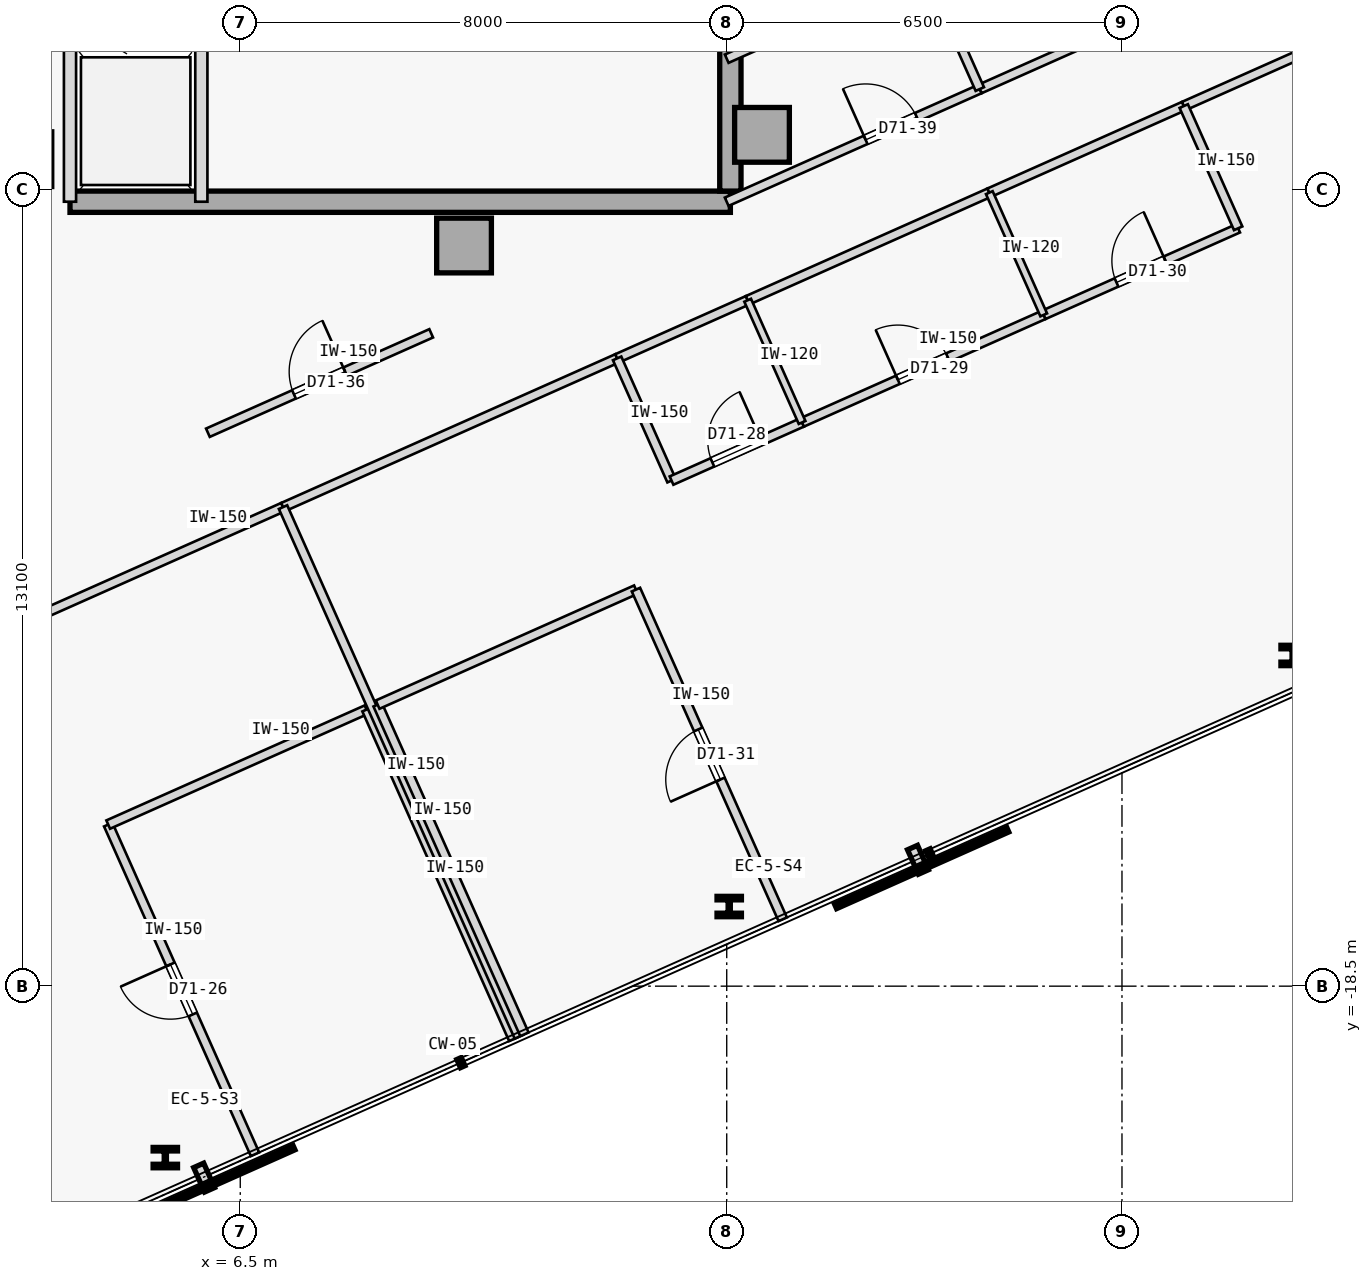
"""IFC4 building model, lengths in metres.
Left out: names, types, materials, properties, quantities, classifications, styles, units other than length and angle.
Written with IfcOpenShell. Run it as: python <this file> out.ifc"""

import sys

from ifc_helpers import new_model, si_unit, direction, frame, frame_2d, origin, origin_2d, place, context, subcontext, project, spatial, rectangle, i_section, extrude, element, fill, save


model = new_model("IFC4")
c1 = context("Model", 3, precision=1e-05, world=origin(), true_north=direction((0.0, 1.0)))
c2 = subcontext(c1, "Body", "Model", "MODEL_VIEW")
j1 = project(units=[si_unit("LENGTHUNIT", "METRE"), si_unit("PLANEANGLEUNIT", "RADIAN")], contexts=[c1])
p1 = place(None, origin())
s1 = spatial("IfcSite", under=j1, at=p1, CompositionType="ELEMENT")
p2 = place(p1, origin())
s2 = spatial("IfcBuilding", under=s1, at=p2, CompositionType="ELEMENT")
p3 = place(p2, frame((0.0, 0.0, 265.55)))
s3 = spatial("IfcBuildingStorey", under=s2, at=p3, CompositionType="ELEMENT", Elevation=265.55)
for number, where, z_axis, x_axis in (
    (1, (15.08, -4.5, 0.0), (0.0, 0.0, 1.0), (1.0, 0.0, 0.0)),
    (2, (10.18, -6.32, 0.0), (0.0, 0.0, 1.0), (1.0, 0.0, 0.0)),
):
    element("IfcColumn", number, at=place(p3, frame(where, z_axis=z_axis, x_axis=x_axis)), inside=s3, PredefinedType="COLUMN", context=c2, shape_type="SweptSolid", body=[
        extrude(rectangle(XDim=0.9, YDim=0.9, at=origin_2d()), origin(), (0.0, 0.0, 1.0), 3.35),
    ])
p4 = place(p3, frame((3.7, -5.6, 0.0), z_axis=(0.0, 0.0, 1.0), x_axis=(1.0, 0.0, 0.0)))
e3 = element("IfcWall", 3, at=p4, inside=s3, PredefinedType="SHEAR", context=c2, shape_type="SweptSolid", body=[
    extrude(rectangle(XDim=10.86, YDim=0.35, at=frame_2d((5.43, 0.0))), origin(), (0.0, 0.0, 1.0), 3.125),
])
p5 = place(p3, frame((14.56, -5.425, 0.0), z_axis=(0.0, 0.0, 1.0), x_axis=(0.0, 1.0, 0.0)))
e4 = element("IfcWall", 4, at=p5, inside=s3, PredefinedType="SHEAR", context=c2, shape_type="SweptSolid", body=[
    extrude(rectangle(XDim=10.85, YDim=0.35, at=frame_2d((5.425, 0.0))), origin(), (0.0, 0.0, 1.0), 3.125),
])
for number, where, z_axis, x_axis in (
    (5, (5.268, -21.319, 0.0), (0.0, 0.0, 1.0), (1.0, 0.0, 0.0)),
    (6, (14.541, -17.19, 0.0), (0.0, 0.0, 1.0), (1.0, 0.0, 0.0)),
    (7, (23.814, -13.062, 0.0), (0.0, 0.0, 1.0), (1.0, 0.0, 0.0)),
):
    element("IfcColumn", number, at=place(p3, frame(where, z_axis=z_axis, x_axis=x_axis)), inside=s3, PredefinedType="COLUMN", context=c2, shape_type="SweptSolid", body=[
        extrude(i_section(OverallWidth=0.401, OverallDepth=0.335, WebThickness=0.036, FlangeThickness=0.058, FilletRadius=0.015, at=origin_2d()), origin(), (0.0, 0.0, 1.0), 3.35),
    ])
for number, where, z_axis, x_axis in (
    (8, (3.7, -5.6, 0.0), (0.0, 0.0, 1.0), (0.0, 1.0, 0.0)),
    (9, (5.86, -5.6, 0.0), (0.0, 0.0, 1.0), (0.0, 1.0, 0.0)),
):
    element("IfcWall", number, at=place(p3, frame(where, z_axis=z_axis, x_axis=x_axis)), inside=s3, PredefinedType="STANDARD", context=c2, shape_type="SweptSolid", body=[
        extrude(rectangle(XDim=2.65, YDim=0.2, at=frame_2d((1.325, 0.0))), origin(), (0.0, 0.0, 1.0), 3.125),
    ])
p6 = place(p3, frame((-4.445, -15.808, 0.0), z_axis=(0.0, 0.0, 1.0), x_axis=(0.913546853922, 0.406733506966, 0.0)))
e10 = element("IfcWall", 10, at=p6, inside=s3, PredefinedType="PARTITIONING", context=c2, shape_type="SweptSolid", body=[
    extrude(rectangle(XDim=12.751, YDim=0.15, at=frame_2d((6.375, 0.0))), origin(), (0.0, 0.0, 1.0), 3.125),
])
p7 = place(p6, frame((5.9, 0.0, 0.0)))
e11 = element("IfcOpeningElement", 11, at=p7, cuts=e10, PredefinedType="OPENING", context=c2, shape_type="SweptSolid", body=[
    extrude(rectangle(XDim=0.95, YDim=2.15, at=frame_2d((0.475, 1.075))), frame((0.0, 0.085, 0.0), z_axis=(0.0, -1.0, 0.0), x_axis=(1.0, 0.0, 0.0)), (0.0, 0.0, 1.0), 0.17),
])
p8 = place(p3, frame((7.204, -10.622, 0.0), z_axis=(0.0, 0.0, 1.0), x_axis=(0.913545172627, 0.406737283231, 0.0)))
e12 = element("IfcWall", 12, at=p8, inside=s3, PredefinedType="PARTITIONING", context=c2, shape_type="SweptSolid", body=[
    extrude(rectangle(XDim=6.014, YDim=0.15, at=frame_2d((3.007, 0.0))), origin(), (0.0, 0.0, 1.0), 3.125),
])
p9 = place(p3, frame((22.016, -4.027, 0.0), z_axis=(0.0, 0.0, 1.0), x_axis=(0.913548968583, 0.406728757282, 0.0)))
e13 = element("IfcWall", 13, at=p9, inside=s3, PredefinedType="PARTITIONING", context=c2, shape_type="SweptSolid", body=[
    extrude(rectangle(XDim=11.242, YDim=0.15, at=frame_2d((5.621, 0.0))), origin(), (0.0, 0.0, 1.0), 3.125),
])
p10 = place(p9, frame((5.146, 0.0, 0.0)))
e14 = element("IfcOpeningElement", 14, at=p10, cuts=e13, PredefinedType="OPENING", context=c2, shape_type="SweptSolid", body=[
    extrude(rectangle(XDim=0.95, YDim=2.15, at=frame_2d((0.475, 1.075))), frame((0.0, 0.085, 0.0), z_axis=(0.0, -1.0, 0.0), x_axis=(1.0, 0.0, 0.0)), (0.0, 0.0, 1.0), 0.17),
])
p11 = place(p3, frame((12.698, -8.176, 0.0), z_axis=(0.0, 0.0, 1.0), x_axis=(0.913558622212, 0.406707073682, 0.0)))
e15 = element("IfcWall", 15, at=p11, inside=s3, PredefinedType="PARTITIONING", context=c2, shape_type="SweptSolid", body=[
    extrude(rectangle(XDim=2.35, YDim=0.15, at=frame_2d((1.175, 0.0))), origin(), (0.0, 0.0, 1.0), 3.125),
])
p12 = place(p3, frame((14.844, -7.22, 0.0), z_axis=(0.0, 0.0, 1.0), x_axis=(0.913524337797, 0.406784075711, 0.0)))
e16 = element("IfcWall", 16, at=p12, inside=s3, PredefinedType="PARTITIONING", context=c2, shape_type="SweptSolid", body=[
    extrude(rectangle(XDim=4.35, YDim=0.15, at=frame_2d((2.175, 0.0))), origin(), (0.0, 0.0, 1.0), 3.125),
])
p13 = place(p3, frame((18.818, -5.451, 0.0), z_axis=(0.0, 0.0, 1.0), x_axis=(0.913538066796, 0.406753242783, 0.0)))
e17 = element("IfcWall", 17, at=p13, inside=s3, PredefinedType="PARTITIONING", context=c2, shape_type="SweptSolid", body=[
    extrude(rectangle(XDim=3.5, YDim=0.15, at=frame_2d((1.75, 0.0))), origin(), (0.0, 0.0, 1.0), 3.125),
])
p14 = place(p3, frame((5.968, -9.399, 0.0), z_axis=(0.0, 0.0, 1.0), x_axis=(0.913563383118, 0.406696379412, 0.0)))
e18 = element("IfcWall", 18, at=p14, inside=s3, PredefinedType="PARTITIONING", context=c2, shape_type="SweptSolid", body=[
    extrude(rectangle(XDim=4.019, YDim=0.15, at=frame_2d((2.01, 0.0))), origin(), (0.0, 0.0, 1.0), 3.125),
])
p15 = place(p14, frame((1.55, 0.0, 0.0)))
e19 = element("IfcOpeningElement", 19, at=p15, cuts=e18, PredefinedType="OPENING", context=c2, shape_type="SweptSolid", body=[
    extrude(rectangle(XDim=0.92, YDim=2.15, at=frame_2d((0.46, 1.075))), frame((0.0, 0.085, 0.0), z_axis=(0.0, -1.0, 0.0), x_axis=(1.0, 0.0, 0.0)), (0.0, 0.0, 1.0), 0.17),
])
p16 = place(p3, frame((14.5, -5.6, 0.0), z_axis=(0.0, 0.0, 1.0), x_axis=(0.913550607208, 0.406725076766, 0.0)))
e20 = element("IfcWall", 20, at=p16, inside=s3, PredefinedType="PARTITIONING", context=c2, shape_type="SweptSolid", body=[
    extrude(rectangle(XDim=4.556, YDim=0.15, at=frame_2d((2.278, 0.0))), origin(), (0.0, 0.0, 1.0), 3.125),
])
p17 = place(p16, frame((2.501, 0.0, 0.0)))
e21 = element("IfcOpeningElement", 21, at=p17, cuts=e20, PredefinedType="OPENING", context=c2, shape_type="SweptSolid", body=[
    extrude(rectangle(XDim=0.92, YDim=2.15, at=frame_2d((0.46, 1.075))), frame((0.0, 0.085, 0.0), z_axis=(0.0, -1.0, 0.0), x_axis=(1.0, 0.0, 0.0)), (0.0, 0.0, 1.0), 0.17),
])
p18 = place(p3, frame((18.662, -3.747, 0.0), z_axis=(0.0, 0.0, 1.0), x_axis=(0.913544622417, 0.406738519018, 0.0)))
e22 = element("IfcWall", 22, at=p18, inside=s3, PredefinedType="PARTITIONING", context=c2, shape_type="SweptSolid", body=[
    extrude(rectangle(XDim=14.192, YDim=0.15, at=frame_2d((7.096, 0.0))), origin(), (0.0, 0.0, 1.0), 3.125),
])
p19 = place(p18, frame((6.636, 0.0, 0.0)))
e23 = element("IfcOpeningElement", 23, at=p19, cuts=e22, PredefinedType="OPENING", context=c2, shape_type="SweptSolid", body=[
    extrude(rectangle(XDim=0.92, YDim=2.15, at=frame_2d((0.46, 1.075))), frame((0.0, 0.085, 0.0), z_axis=(0.0, -1.0, 0.0), x_axis=(1.0, 0.0, 0.0)), (0.0, 0.0, 1.0), 0.17),
])
p20 = place(p3, frame((6.742, -21.265, 0.0), z_axis=(0.0, 0.0, 1.0), x_axis=(-0.406749048544, 0.913539934271, 0.0)))
e24 = element("IfcWall", 24, at=p20, inside=s3, PredefinedType="PARTITIONING", context=c2, shape_type="SweptSolid", body=[
    extrude(rectangle(XDim=5.935, YDim=0.15, at=frame_2d((2.968, 0.0))), origin(), (0.0, 0.0, 1.0), 3.125),
])
p21 = place(p20, frame((2.518, 0.0, 0.0)))
e25 = element("IfcOpeningElement", 25, at=p21, cuts=e24, PredefinedType="OPENING", context=c2, shape_type="SweptSolid", body=[
    extrude(rectangle(XDim=0.9, YDim=2.15, at=frame_2d((0.45, 1.075))), frame((0.0, 0.085, 0.0), z_axis=(0.0, -1.0, 0.0), x_axis=(1.0, 0.0, 0.0)), (0.0, 0.0, 1.0), 0.17),
])
p22 = place(p3, frame((4.328, -15.843, 0.0), z_axis=(0.0, 0.0, 1.0), x_axis=(0.91354505039, 0.40673755778, 0.0)))
e26 = element("IfcWall", 26, at=p22, inside=s3, PredefinedType="PARTITIONING", context=c2, shape_type="SweptSolid", body=[
    extrude(rectangle(XDim=4.65, YDim=0.15, at=frame_2d((2.325, 0.0))), origin(), (0.0, 0.0, 1.0), 3.125),
])
p23 = place(p3, frame((10.99, -19.373, 0.0), z_axis=(0.0, 0.0, 1.0), x_axis=(-0.406749048544, 0.913539934271, 0.0)))
e27 = element("IfcWall", 27, at=p23, inside=s3, PredefinedType="PARTITIONING", context=c2, shape_type="SweptSolid", body=[
    extrude(rectangle(XDim=5.935, YDim=0.15, at=frame_2d((2.968, 0.0))), origin(), (0.0, 0.0, 1.0), 3.125),
])
p24 = place(p3, frame((11.082, -19.333, 0.0), z_axis=(0.0, 0.0, 1.0), x_axis=(-0.406729927653, 0.913548447512, 0.0)))
e28 = element("IfcWall", 28, at=p24, inside=s3, PredefinedType="PARTITIONING", context=c2, shape_type="SweptSolid", body=[
    extrude(rectangle(XDim=9.535, YDim=0.15, at=frame_2d((4.768, 0.0))), origin(), (0.0, 0.0, 1.0), 3.125),
])
p25 = place(p3, frame((13.592, -10.186, 0.0), z_axis=(0.0, 0.0, 1.0), x_axis=(-0.406725294076, 0.913550510459, 0.0)))
e29 = element("IfcWall", 29, at=p25, inside=s3, PredefinedType="PARTITIONING", context=c2, shape_type="SweptSolid", body=[
    extrude(rectangle(XDim=2.2, YDim=0.15, at=frame_2d((1.1, 0.0))), origin(), (0.0, 0.0, 1.0), 3.125),
])
p26 = place(p3, frame((13.592, -10.186, 0.0), z_axis=(0.0, 0.0, 1.0), x_axis=(0.913558622212, 0.406707073682, 0.0)))
e30 = element("IfcWall", 30, at=p26, inside=s3, PredefinedType="PARTITIONING", context=c2, shape_type="SweptSolid", body=[
    extrude(rectangle(XDim=2.35, YDim=0.15, at=frame_2d((1.175, 0.0))), origin(), (0.0, 0.0, 1.0), 3.125),
])
p27 = place(p26, frame((0.735, 0.0, 0.0)))
e31 = element("IfcOpeningElement", 31, at=p27, cuts=e30, PredefinedType="OPENING", context=c2, shape_type="SweptSolid", body=[
    extrude(rectangle(XDim=0.88, YDim=2.15, at=frame_2d((0.44, 1.075))), frame((0.0, 0.085, 0.0), z_axis=(0.0, -1.0, 0.0), x_axis=(1.0, 0.0, 0.0)), (0.0, 0.0, 1.0), 0.17),
])
p28 = place(p3, frame((15.739, -9.23, 0.0), z_axis=(0.0, 0.0, 1.0), x_axis=(0.913545193015, 0.406737237438, 0.0)))
e32 = element("IfcWall", 32, at=p28, inside=s3, PredefinedType="PARTITIONING", context=c2, shape_type="SweptSolid", body=[
    extrude(rectangle(XDim=4.35, YDim=0.15, at=frame_2d((2.175, 0.0))), origin(), (0.0, 0.0, 1.0), 3.125),
])
p29 = place(p28, frame((1.725, 0.0, 0.0)))
e33 = element("IfcOpeningElement", 33, at=p29, cuts=e32, PredefinedType="OPENING", context=c2, shape_type="SweptSolid", body=[
    extrude(rectangle(XDim=0.9, YDim=2.15, at=frame_2d((0.45, 1.075))), frame((0.0, 0.085, 0.0), z_axis=(0.0, -1.0, 0.0), x_axis=(1.0, 0.0, 0.0)), (0.0, 0.0, 1.0), 0.17),
])
p30 = place(p3, frame((19.713, -7.461, 0.0), z_axis=(0.0, 0.0, 1.0), x_axis=(0.913549606868, 0.406727323635, 0.0)))
e34 = element("IfcWall", 34, at=p30, inside=s3, PredefinedType="PARTITIONING", context=c2, shape_type="SweptSolid", body=[
    extrude(rectangle(XDim=3.5, YDim=0.15, at=frame_2d((1.75, 0.0))), origin(), (0.0, 0.0, 1.0), 3.125),
])
p31 = place(p30, frame((1.31, 0.0, 0.0)))
e35 = element("IfcOpeningElement", 35, at=p31, cuts=e34, PredefinedType="OPENING", context=c2, shape_type="SweptSolid", body=[
    extrude(rectangle(XDim=0.88, YDim=2.15, at=frame_2d((0.44, 1.075))), frame((0.0, 0.085, 0.0), z_axis=(0.0, -1.0, 0.0), x_axis=(1.0, 0.0, 0.0)), (0.0, 0.0, 1.0), 0.17),
])
p32 = place(p3, frame((22.911, -6.037, 0.0), z_axis=(0.0, 0.0, 1.0), x_axis=(-0.40677666873, 0.913527636022, 0.0)))
e36 = element("IfcWall", 36, at=p32, inside=s3, PredefinedType="PARTITIONING", context=c2, shape_type="SweptSolid", body=[
    extrude(rectangle(XDim=2.2, YDim=0.15, at=frame_2d((1.1, 0.0))), origin(), (0.0, 0.0, 1.0), 3.125),
])
p33 = place(p3, frame((11.173, -19.292, 0.0), z_axis=(0.0, 0.0, 1.0), x_axis=(-0.406749048544, 0.913539934271, 0.0)))
e37 = element("IfcWall", 37, at=p33, inside=s3, PredefinedType="PARTITIONING", context=c2, shape_type="SweptSolid", body=[
    extrude(rectangle(XDim=5.935, YDim=0.15, at=frame_2d((2.968, 0.0))), origin(), (0.0, 0.0, 1.0), 3.125),
])
p34 = place(p3, frame((8.759, -13.87, 0.0), z_axis=(0.0, 0.0, 1.0), x_axis=(0.91354505039, 0.40673755778, 0.0)))
e38 = element("IfcWall", 38, at=p34, inside=s3, PredefinedType="PARTITIONING", context=c2, shape_type="SweptSolid", body=[
    extrude(rectangle(XDim=4.65, YDim=0.15, at=frame_2d((2.325, 0.0))), origin(), (0.0, 0.0, 1.0), 3.125),
])
p35 = place(p3, frame((15.421, -17.401, 0.0), z_axis=(0.0, 0.0, 1.0), x_axis=(-0.406749048544, 0.913539934271, 0.0)))
e39 = element("IfcWall", 39, at=p35, inside=s3, PredefinedType="PARTITIONING", context=c2, shape_type="SweptSolid", body=[
    extrude(rectangle(XDim=5.935, YDim=0.15, at=frame_2d((2.968, 0.0))), origin(), (0.0, 0.0, 1.0), 3.125),
])
p36 = place(p35, frame((2.518, 0.0, 0.0)))
e40 = element("IfcOpeningElement", 40, at=p36, cuts=e39, PredefinedType="OPENING", context=c2, shape_type="SweptSolid", body=[
    extrude(rectangle(XDim=0.9, YDim=2.15, at=frame_2d((0.45, 1.075))), frame((0.0, 0.085, 0.0), z_axis=(0.0, -1.0, 0.0), x_axis=(1.0, 0.0, 0.0)), (0.0, 0.0, 1.0), 0.17),
])
p37 = place(p3, frame((15.739, -9.23, 0.0), z_axis=(0.0, 0.0, 1.0), x_axis=(-0.406725294076, 0.913550510459, 0.0)))
e41 = element("IfcWall", 41, at=p37, inside=s3, PredefinedType="PARTITIONING", context=c2, shape_type="SweptSolid", body=[
    extrude(rectangle(XDim=2.2, YDim=0.12, at=frame_2d((1.1, 0.0))), origin(), (0.0, 0.0, 1.0), 3.125),
])
p38 = place(p3, frame((19.713, -7.461, 0.0), z_axis=(0.0, 0.0, 1.0), x_axis=(-0.406684063321, 0.913568865845, 0.0)))
e42 = element("IfcWall", 42, at=p38, inside=s3, PredefinedType="PARTITIONING", context=c2, shape_type="SweptSolid", body=[
    extrude(rectangle(XDim=2.2, YDim=0.12, at=frame_2d((1.1, 0.0))), origin(), (0.0, 0.0, 1.0), 3.125),
])
p39 = place(p3, frame((14.5, -3.248, 0.0), z_axis=(0.0, 0.0, 1.0), x_axis=(0.913542803573, 0.40674260416, 0.0)))
e43 = element("IfcWall", 43, at=p39, inside=s3, PredefinedType="PARTITIONING", context=c2, shape_type="SweptSolid", body=[
    extrude(rectangle(XDim=3.599, YDim=0.15, at=frame_2d((1.8, 0.0))), origin(), (0.0, 0.0, 1.0), 3.125),
])
p40 = place(p39, frame((1.34, 0.0, 0.0)))
e44 = element("IfcOpeningElement", 44, at=p40, cuts=e43, PredefinedType="OPENING", context=c2, shape_type="SweptSolid", body=[
    extrude(rectangle(XDim=0.92, YDim=2.15, at=frame_2d((0.46, 1.075))), frame((0.0, 0.085, 0.0), z_axis=(0.0, -1.0, 0.0), x_axis=(1.0, 0.0, 0.0)), (0.0, 0.0, 1.0), 0.17),
])
p41 = place(p3, frame((18.662, -3.747, 0.0), z_axis=(0.0, 0.0, 1.0), x_axis=(-0.406686481677, 0.913567789286, 0.0)))
e45 = element("IfcWall", 45, at=p41, inside=s3, PredefinedType="PARTITIONING", context=c2, shape_type="SweptSolid", body=[
    extrude(rectangle(XDim=2.149, YDim=0.15, at=frame_2d((1.075, 0.0))), origin(), (0.0, 0.0, 1.0), 3.125),
])
p42 = place(p21, origin())
e46 = element("IfcDoor", 46, at=p42, inside=s3, OperationType="SINGLE_SWING_RIGHT", PredefinedType="DOOR", context=c2, shape_type="SweptSolid", body=[
    extrude(rectangle(XDim=0.9, YDim=2.15, at=frame_2d((0.45, 1.075))), frame((0.0, 0.025, 0.0), z_axis=(0.0, -1.0, 0.0), x_axis=(1.0, 0.0, 0.0)), (0.0, 0.0, 1.0), 0.05),
])
fill(e25, e46)
p43 = place(p27, origin())
e47 = element("IfcDoor", 47, at=p43, inside=s3, OperationType="SINGLE_SWING_RIGHT", PredefinedType="DOOR", context=c2, shape_type="SweptSolid", body=[
    extrude(rectangle(XDim=0.88, YDim=2.15, at=frame_2d((0.44, 1.075))), frame((0.0, 0.025, 0.0), z_axis=(0.0, -1.0, 0.0), x_axis=(1.0, 0.0, 0.0)), (0.0, 0.0, 1.0), 0.05),
])
fill(e31, e47)
p44 = place(p29, origin())
e48 = element("IfcDoor", 48, at=p44, inside=s3, OperationType="SINGLE_SWING_LEFT", PredefinedType="DOOR", context=c2, shape_type="SweptSolid", body=[
    extrude(rectangle(XDim=0.9, YDim=2.15, at=frame_2d((0.45, 1.075))), frame((0.0, 0.025, 0.0), z_axis=(0.0, -1.0, 0.0), x_axis=(1.0, 0.0, 0.0)), (0.0, 0.0, 1.0), 0.05),
])
fill(e33, e48)
p45 = place(p31, origin())
e49 = element("IfcDoor", 49, at=p45, inside=s3, OperationType="SINGLE_SWING_RIGHT", PredefinedType="DOOR", context=c2, shape_type="SweptSolid", body=[
    extrude(rectangle(XDim=0.88, YDim=2.15, at=frame_2d((0.44, 1.075))), frame((0.0, 0.025, 0.0), z_axis=(0.0, -1.0, 0.0), x_axis=(1.0, 0.0, 0.0)), (0.0, 0.0, 1.0), 0.05),
])
fill(e35, e49)
p46 = place(p36, origin())
e50 = element("IfcDoor", 50, at=p46, inside=s3, OperationType="SINGLE_SWING_LEFT", PredefinedType="DOOR", context=c2, shape_type="SweptSolid", body=[
    extrude(rectangle(XDim=0.9, YDim=2.15, at=frame_2d((0.45, 1.075))), frame((0.0, 0.025, 0.0), z_axis=(0.0, -1.0, 0.0), x_axis=(1.0, 0.0, 0.0)), (0.0, 0.0, 1.0), 0.05),
])
fill(e40, e50)
p47 = place(p15, origin())
e51 = element("IfcDoor", 51, at=p47, inside=s3, OperationType="SINGLE_SWING_RIGHT", PredefinedType="DOOR", context=c2, shape_type="SweptSolid", body=[
    extrude(rectangle(XDim=0.92, YDim=2.15, at=frame_2d((0.46, 1.075))), frame((0.0, 0.025, 0.0), z_axis=(0.0, -1.0, 0.0), x_axis=(1.0, 0.0, 0.0)), (0.0, 0.0, 1.0), 0.05),
])
fill(e19, e51)
p48 = place(p17, origin())
e52 = element("IfcDoor", 52, at=p48, inside=s3, OperationType="SINGLE_SWING_LEFT", PredefinedType="DOOR", context=c2, shape_type="SweptSolid", body=[
    extrude(rectangle(XDim=0.92, YDim=2.15, at=frame_2d((0.46, 1.075))), frame((0.0, 0.025, 0.0), z_axis=(0.0, -1.0, 0.0), x_axis=(1.0, 0.0, 0.0)), (0.0, 0.0, 1.0), 0.05),
])
fill(e21, e52)
save(model, sys.argv[1])
